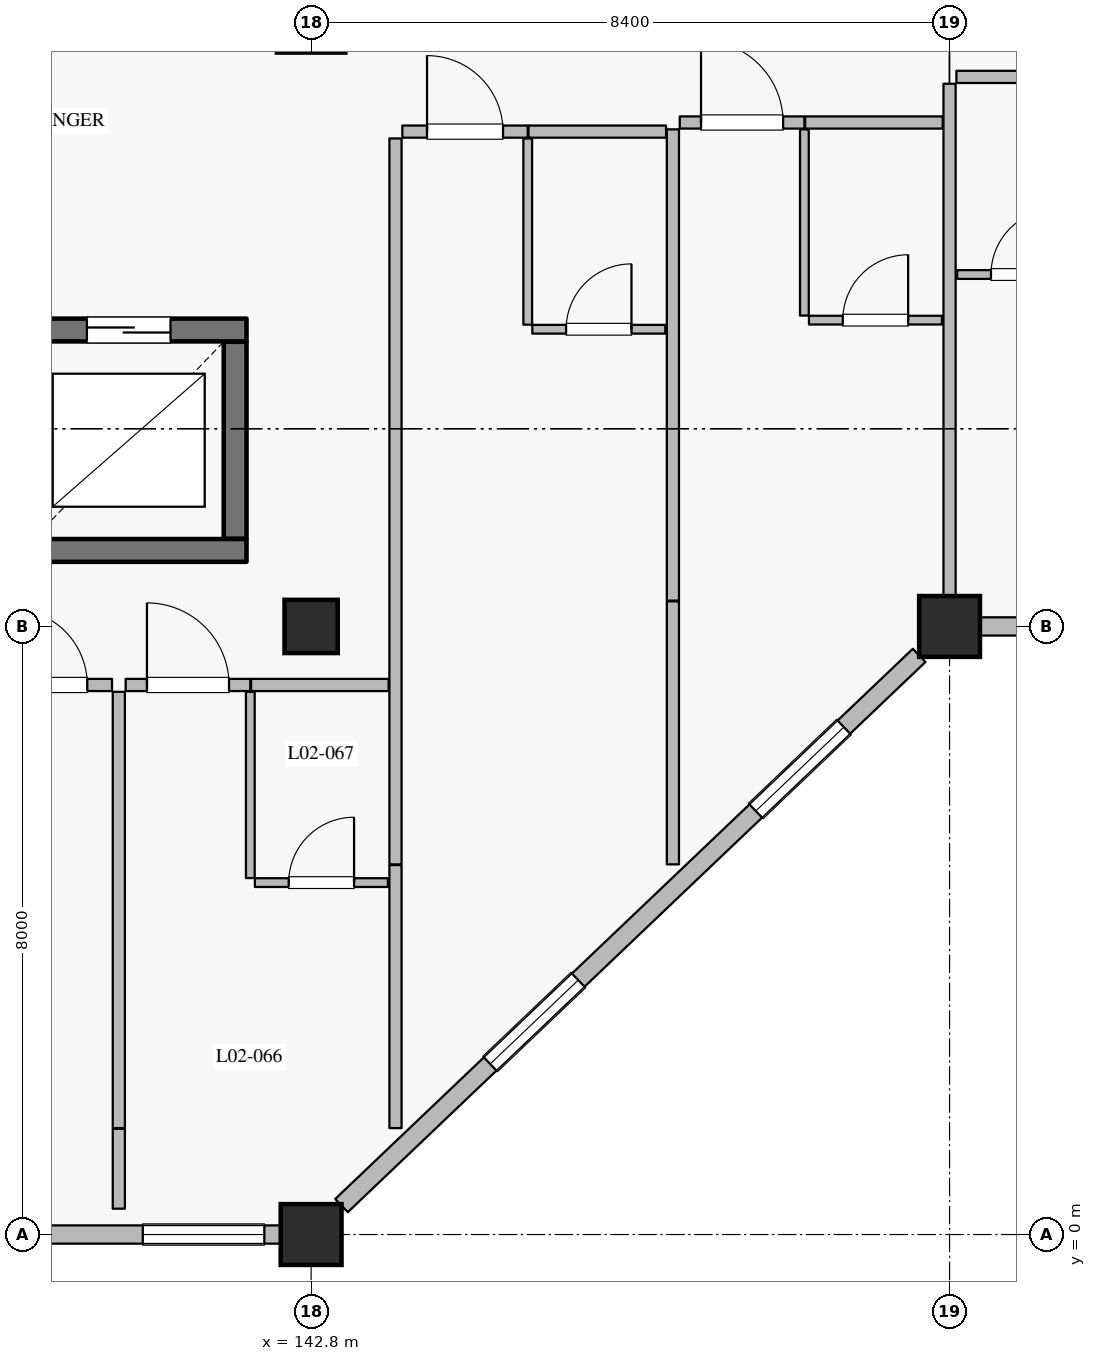
"""IFC4 building model, lengths in metres.
Left out: names, types, materials, properties, quantities, classifications, styles, units other than length and angle.
Written with IfcOpenShell. Run it as: python <this file> out.ifc"""

import sys

from ifc_helpers import new_model, si_unit, direction, frame, frame_2d, origin, origin_2d, place, context, subcontext, project, spatial, rectangle, extrude, element, fill, save


model = new_model("IFC4")
c1 = context("Model", 3, precision=1e-05, world=origin(), true_north=direction((0.0, 1.0)))
c2 = subcontext(c1, "Body", "Model", "MODEL_VIEW")
j1 = project(units=[si_unit("LENGTHUNIT", "METRE"), si_unit("PLANEANGLEUNIT", "RADIAN")], contexts=[c1])
p1 = place(None, origin())
s1 = spatial("IfcSite", under=j1, at=p1, CompositionType="ELEMENT")
p2 = place(p1, origin())
s2 = spatial("IfcBuilding", under=s1, at=p2, CompositionType="ELEMENT")
p3 = place(p2, frame((0.0, 0.0, 11.4)))
s3 = spatial("IfcBuildingStorey", under=s2, at=p3, CompositionType="ELEMENT", Elevation=11.4)
for number, where, z_axis, x_axis in (
    (1, (142.8, 0.0, 0.0), (0.0, 0.0, 1.0), (1.0, 0.0, 0.0)),
    (2, (151.2, 8.0, 0.0), (0.0, 0.0, 1.0), (1.0, 0.0, 0.0)),
):
    element("IfcColumn", number, at=place(p3, frame(where, z_axis=z_axis, x_axis=x_axis)), inside=s3, PredefinedType="COLUMN", context=c2, shape_type="SweptSolid", body=[
        extrude(rectangle(XDim=0.8, YDim=0.8, at=origin_2d()), origin(), (0.0, 0.0, 1.0), 4.8),
    ])
p4 = place(p3, frame((142.8, 8.0, 0.0), z_axis=(0.0, 0.0, 1.0), x_axis=(1.0, 0.0, 0.0)))
e3 = element("IfcColumn", 3, at=p4, inside=s3, PredefinedType="COLUMN", context=c2, shape_type="SweptSolid", body=[
    extrude(rectangle(XDim=0.7, YDim=0.7, at=origin_2d()), origin(), (0.0, 0.0, 1.0), 4.8),
])
p5 = place(p3, frame((142.4, 0.0, 0.0), z_axis=(0.0, 0.0, 1.0), x_axis=(-1.0, 0.0, 0.0)))
e4 = element("IfcWall", 4, at=p5, inside=s3, PredefinedType="SOLIDWALL", context=c2, shape_type="SweptSolid", body=[
    extrude(rectangle(XDim=7.6, YDim=0.24, at=frame_2d((3.8, 0.0))), origin(), (0.0, 0.0, 1.0), 4.13),
])
p6 = place(p5, frame((0.215, 0.0, 0.8)))
e5 = element("IfcOpeningElement", 5, at=p6, cuts=e4, PredefinedType="OPENING", context=c2, shape_type="SweptSolid", body=[
    extrude(rectangle(XDim=1.6, YDim=1.6, at=frame_2d((0.8, 0.8))), frame((0.0, 0.13, 0.0), z_axis=(0.0, -1.0, 0.0), x_axis=(1.0, 0.0, 0.0)), (0.0, 0.0, 1.0), 0.26),
])
p7 = place(p5, frame((3.155, 0.0, 0.8)))
e6 = element("IfcOpeningElement", 6, at=p7, cuts=e4, PredefinedType="OPENING", context=c2, shape_type="SweptSolid", body=[
    extrude(rectangle(XDim=1.6, YDim=1.6, at=frame_2d((0.8, 0.8))), frame((0.0, 0.13, 0.0), z_axis=(0.0, -1.0, 0.0), x_axis=(1.0, 0.0, 0.0)), (0.0, 0.0, 1.0), 0.26),
])
p8 = place(p5, frame((6.04, 0.0, 0.8)))
e7 = element("IfcOpeningElement", 7, at=p8, cuts=e4, PredefinedType="OPENING", context=c2, shape_type="SweptSolid", body=[
    extrude(rectangle(XDim=1.4, YDim=1.6, at=frame_2d((0.7, 0.8))), frame((0.0, 0.13, 0.0), z_axis=(0.0, -1.0, 0.0), x_axis=(1.0, 0.0, 0.0)), (0.0, 0.0, 1.0), 0.26),
])
p9 = place(p3, frame((150.8, 7.619, 0.0), z_axis=(0.0, 0.0, 1.0), x_axis=(-0.724156739794, -0.689635422677, 0.0)))
e8 = element("IfcWall", 8, at=p9, inside=s3, PredefinedType="SOLIDWALL", context=c2, shape_type="SweptSolid", body=[
    extrude(rectangle(XDim=10.495, YDim=0.24, at=frame_2d((5.248, 0.0))), origin(), (0.0, 0.0, 1.0), 4.13),
])
p10 = place(p9, frame((1.368, 0.0, 0.8)))
e9 = element("IfcOpeningElement", 9, at=p10, cuts=e8, PredefinedType="OPENING", context=c2, shape_type="SweptSolid", body=[
    extrude(rectangle(XDim=1.6, YDim=1.6, at=frame_2d((0.8, 0.8))), frame((0.0, 0.13, 0.0), z_axis=(0.0, -1.0, 0.0), x_axis=(1.0, 0.0, 0.0)), (0.0, 0.0, 1.0), 0.26),
])
p11 = place(p9, frame((6.194, 0.0, 0.8)))
e10 = element("IfcOpeningElement", 10, at=p11, cuts=e8, PredefinedType="OPENING", context=c2, shape_type="SweptSolid", body=[
    extrude(rectangle(XDim=1.6, YDim=1.6, at=frame_2d((0.8, 0.8))), frame((0.0, 0.13, 0.0), z_axis=(0.0, -1.0, 0.0), x_axis=(1.0, 0.0, 0.0)), (0.0, 0.0, 1.0), 0.26),
])
p12 = place(p3, frame((159.2, 8.0, 0.0), z_axis=(0.0, 0.0, 1.0), x_axis=(-1.0, 0.0, 0.0)))
e11 = element("IfcWall", 11, at=p12, inside=s3, PredefinedType="SOLIDWALL", context=c2, shape_type="SweptSolid", body=[
    extrude(rectangle(XDim=7.6, YDim=0.24, at=frame_2d((3.8, 0.0))), origin(), (0.0, 0.0, 1.0), 4.13),
])
p13 = place(p12, frame((1.735, 0.0, 0.8)))
e12 = element("IfcOpeningElement", 12, at=p13, cuts=e11, PredefinedType="OPENING", context=c2, shape_type="SweptSolid", body=[
    extrude(rectangle(XDim=1.6, YDim=1.6, at=frame_2d((0.8, 0.8))), frame((0.0, 0.13, 0.0), z_axis=(0.0, -1.0, 0.0), x_axis=(1.0, 0.0, 0.0)), (0.0, 0.0, 1.0), 0.26),
])
p14 = place(p12, frame((5.23, 0.0, 0.8)))
e13 = element("IfcOpeningElement", 13, at=p14, cuts=e11, PredefinedType="OPENING", context=c2, shape_type="SweptSolid", body=[
    extrude(rectangle(XDim=1.6, YDim=1.6, at=frame_2d((0.8, 0.8))), frame((0.0, 0.13, 0.0), z_axis=(0.0, -1.0, 0.0), x_axis=(1.0, 0.0, 0.0)), (0.0, 0.0, 1.0), 0.26),
])
p15 = place(p3, frame((138.85, 9.0, 0.0), z_axis=(0.0, 0.0, 1.0), x_axis=(1.0, 0.0, 0.0)))
e14 = element("IfcWall", 14, at=p15, inside=s3, PredefinedType="SHEAR", context=c2, shape_type="SweptSolid", body=[
    extrude(rectangle(XDim=3.1, YDim=0.3, at=frame_2d((1.55, 0.0))), origin(), (0.0, 0.0, 1.0), 4.535),
])
p16 = place(p3, frame((141.8, 9.155, 0.0), z_axis=(0.0, 0.0, 1.0), x_axis=(0.0, 1.0, 0.0)))
e15 = element("IfcWall", 15, at=p16, inside=s3, PredefinedType="SHEAR", context=c2, shape_type="SweptSolid", body=[
    extrude(rectangle(XDim=2.59, YDim=0.3, at=frame_2d((1.295, 0.0))), origin(), (0.0, 0.0, 1.0), 4.535),
])
p17 = place(p3, frame((141.95, 11.9, 0.0), z_axis=(0.0, 0.0, 1.0), x_axis=(-1.0, 0.0, 0.0)))
e16 = element("IfcWall", 16, at=p17, inside=s3, PredefinedType="SHEAR", context=c2, shape_type="SweptSolid", body=[
    extrude(rectangle(XDim=3.1, YDim=0.3, at=frame_2d((1.55, 0.0))), origin(), (0.0, 0.0, 1.0), 4.535),
])
p18 = place(p17, frame((1.0, 0.0, 0.0)))
e17 = element("IfcOpeningElement", 17, at=p18, cuts=e16, PredefinedType="OPENING", context=c2, shape_type="SweptSolid", body=[
    extrude(rectangle(XDim=1.1, YDim=2.2, at=frame_2d((0.55, 1.1))), frame((0.0, 0.16, 0.0), z_axis=(0.0, -1.0, 0.0), x_axis=(1.0, 0.0, 0.0)), (0.0, 0.0, 1.0), 0.32),
])
p19 = place(p3, frame((138.53, 7.23, 0.0), z_axis=(0.0, 0.0, 1.0), x_axis=(1.0, 0.0, 0.0)))
e18 = element("IfcWall", 18, at=p19, inside=s3, PredefinedType="PARTITIONING", context=c2, shape_type="SweptSolid", body=[
    extrude(rectangle(XDim=1.65, YDim=0.16, at=frame_2d((0.825, 0.0))), origin(), (0.0, 0.0, 1.0), 4.535),
])
p20 = place(p19, frame((0.325, 0.0, 0.0)))
e19 = element("IfcOpeningElement", 19, at=p20, cuts=e18, PredefinedType="OPENING", context=c2, shape_type="SweptSolid", body=[
    extrude(rectangle(XDim=1.0, YDim=2.25, at=frame_2d((0.5, 1.125))), frame((0.0, 0.09, 0.0), z_axis=(0.0, -1.0, 0.0), x_axis=(1.0, 0.0, 0.0)), (0.0, 0.0, 1.0), 0.18),
])
p21 = place(p3, frame((140.27, 0.34, 0.0), z_axis=(0.0, 0.0, 1.0), x_axis=(0.0, 1.0, 0.0)))
e20 = element("IfcWall", 20, at=p21, inside=s3, PredefinedType="PARTITIONING", context=c2, shape_type="SweptSolid", body=[
    extrude(rectangle(XDim=1.05, YDim=0.16, at=frame_2d((0.525, 0.0))), origin(), (0.0, 0.0, 1.0), 4.535),
])
p22 = place(p3, frame((140.36, 7.23, 0.0), z_axis=(0.0, 0.0, 1.0), x_axis=(1.0, 0.0, 0.0)))
e21 = element("IfcWall", 21, at=p22, inside=s3, PredefinedType="PARTITIONING", context=c2, shape_type="SweptSolid", body=[
    extrude(rectangle(XDim=1.64, YDim=0.16, at=frame_2d((0.82, 0.0))), origin(), (0.0, 0.0, 1.0), 4.535),
])
p23 = place(p22, frame((0.28, 0.0, 0.0)))
e22 = element("IfcOpeningElement", 22, at=p23, cuts=e21, PredefinedType="OPENING", context=c2, shape_type="SweptSolid", body=[
    extrude(rectangle(XDim=1.08, YDim=2.3, at=frame_2d((0.54, 1.15))), frame((0.0, 0.09, 0.0), z_axis=(0.0, -1.0, 0.0), x_axis=(1.0, 0.0, 0.0)), (0.0, 0.0, 1.0), 0.18),
])
p24 = place(p3, frame((142.01, 7.23, 0.0), z_axis=(0.0, 0.0, 1.0), x_axis=(1.0, 0.0, 0.0)))
e23 = element("IfcWall", 23, at=p24, inside=s3, PredefinedType="PARTITIONING", context=c2, shape_type="SweptSolid", body=[
    extrude(rectangle(XDim=1.81, YDim=0.16, at=frame_2d((0.905, 0.0))), origin(), (0.0, 0.0, 1.0), 4.535),
])
p25 = place(p3, frame((142.0, 4.69, 0.0), z_axis=(0.0, 0.0, 1.0), x_axis=(0.0, 1.0, 0.0)))
e24 = element("IfcWall", 24, at=p25, inside=s3, PredefinedType="PARTITIONING", context=c2, shape_type="SweptSolid", body=[
    extrude(rectangle(XDim=2.45, YDim=0.115, at=frame_2d((1.225, 0.0))), origin(), (0.0, 0.0, 1.0), 4.535),
])
p26 = place(p3, frame((142.06, 4.63, 0.0), z_axis=(0.0, 0.0, 1.0), x_axis=(1.0, 0.0, 0.0)))
e25 = element("IfcWall", 25, at=p26, inside=s3, PredefinedType="PARTITIONING", context=c2, shape_type="SweptSolid", body=[
    extrude(rectangle(XDim=1.75, YDim=0.115, at=frame_2d((0.875, 0.0))), origin(), (0.0, 0.0, 1.0), 4.535),
])
p27 = place(p26, frame((0.445, 0.0, 0.0)))
e26 = element("IfcOpeningElement", 26, at=p27, cuts=e25, PredefinedType="OPENING", context=c2, shape_type="SweptSolid", body=[
    extrude(rectangle(XDim=0.86, YDim=2.12, at=frame_2d((0.43, 1.06))), frame((0.0, 0.067, 0.0), z_axis=(0.0, -1.0, 0.0), x_axis=(1.0, 0.0, 0.0)), (0.0, 0.0, 1.0), 0.135),
])
p28 = place(p3, frame((140.27, 1.4, 0.0), z_axis=(0.0, 0.0, 1.0), x_axis=(0.0, 1.0, 0.0)))
e27 = element("IfcWall", 27, at=p28, inside=s3, PredefinedType="PARTITIONING", context=c2, shape_type="SweptSolid", body=[
    extrude(rectangle(XDim=5.74, YDim=0.16, at=frame_2d((2.87, 0.0))), origin(), (0.0, 0.0, 1.0), 4.535),
])
p29 = place(p3, frame((143.91, 1.4, 0.0), z_axis=(0.0, 0.0, 1.0), x_axis=(0.0, 1.0, 0.0)))
e28 = element("IfcWall", 28, at=p29, inside=s3, PredefinedType="PARTITIONING", context=c2, shape_type="SweptSolid", body=[
    extrude(rectangle(XDim=3.46, YDim=0.16, at=frame_2d((1.73, 0.0))), origin(), (0.0, 0.0, 1.0), 4.535),
])
p30 = place(p3, frame((144.0, 14.51, 0.0), z_axis=(0.0, 0.0, 1.0), x_axis=(1.0, 0.0, 0.0)))
e29 = element("IfcWall", 29, at=p30, inside=s3, PredefinedType="PARTITIONING", context=c2, shape_type="SweptSolid", body=[
    extrude(rectangle(XDim=1.65, YDim=0.16, at=frame_2d((0.825, 0.0))), origin(), (0.0, 0.0, 1.0), 4.535),
])
p31 = place(p30, frame((0.325, 0.0, 0.0)))
e30 = element("IfcOpeningElement", 30, at=p31, cuts=e29, PredefinedType="OPENING", context=c2, shape_type="SweptSolid", body=[
    extrude(rectangle(XDim=1.0, YDim=2.25, at=frame_2d((0.5, 1.125))), frame((0.0, 0.09, 0.0), z_axis=(0.0, -1.0, 0.0), x_axis=(1.0, 0.0, 0.0)), (0.0, 0.0, 1.0), 0.18),
])
p32 = place(p3, frame((145.66, 14.51, 0.0), z_axis=(0.0, 0.0, 1.0), x_axis=(1.0, 0.0, 0.0)))
e31 = element("IfcWall", 31, at=p32, inside=s3, PredefinedType="PARTITIONING", context=c2, shape_type="SweptSolid", body=[
    extrude(rectangle(XDim=1.81, YDim=0.16, at=frame_2d((0.905, 0.0))), origin(), (0.0, 0.0, 1.0), 4.535),
])
p33 = place(p3, frame((145.65, 11.97, 0.0), z_axis=(0.0, 0.0, 1.0), x_axis=(0.0, 1.0, 0.0)))
e32 = element("IfcWall", 32, at=p33, inside=s3, PredefinedType="PARTITIONING", context=c2, shape_type="SweptSolid", body=[
    extrude(rectangle(XDim=2.45, YDim=0.115, at=frame_2d((1.225, 0.0))), origin(), (0.0, 0.0, 1.0), 4.535),
])
p34 = place(p3, frame((145.71, 11.91, 0.0), z_axis=(0.0, 0.0, 1.0), x_axis=(1.0, 0.0, 0.0)))
e33 = element("IfcWall", 33, at=p34, inside=s3, PredefinedType="PARTITIONING", context=c2, shape_type="SweptSolid", body=[
    extrude(rectangle(XDim=1.75, YDim=0.115, at=frame_2d((0.875, 0.0))), origin(), (0.0, 0.0, 1.0), 4.535),
])
p35 = place(p34, frame((0.445, 0.0, 0.0)))
e34 = element("IfcOpeningElement", 34, at=p35, cuts=e33, PredefinedType="OPENING", context=c2, shape_type="SweptSolid", body=[
    extrude(rectangle(XDim=0.86, YDim=2.12, at=frame_2d((0.43, 1.06))), frame((0.0, 0.067, 0.0), z_axis=(0.0, -1.0, 0.0), x_axis=(1.0, 0.0, 0.0)), (0.0, 0.0, 1.0), 0.135),
])
p36 = place(p3, frame((143.91, 4.87, 0.0), z_axis=(0.0, 0.0, 1.0), x_axis=(0.0, 1.0, 0.0)))
e35 = element("IfcWall", 35, at=p36, inside=s3, PredefinedType="PARTITIONING", context=c2, shape_type="SweptSolid", body=[
    extrude(rectangle(XDim=9.55, YDim=0.16, at=frame_2d((4.775, 0.0))), origin(), (0.0, 0.0, 1.0), 4.535),
])
p37 = place(p3, frame((147.56, 4.87, 0.0), z_axis=(0.0, 0.0, 1.0), x_axis=(0.0, 1.0, 0.0)))
e36 = element("IfcWall", 36, at=p37, inside=s3, PredefinedType="PARTITIONING", context=c2, shape_type="SweptSolid", body=[
    extrude(rectangle(XDim=3.46, YDim=0.16, at=frame_2d((1.73, 0.0))), origin(), (0.0, 0.0, 1.0), 4.535),
])
p38 = place(p3, frame((147.65, 14.63, 0.0), z_axis=(0.0, 0.0, 1.0), x_axis=(1.0, 0.0, 0.0)))
e37 = element("IfcWall", 37, at=p38, inside=s3, PredefinedType="PARTITIONING", context=c2, shape_type="SweptSolid", body=[
    extrude(rectangle(XDim=1.64, YDim=0.16, at=frame_2d((0.82, 0.0))), origin(), (0.0, 0.0, 1.0), 4.535),
])
p39 = place(p38, frame((0.28, 0.0, 0.0)))
e38 = element("IfcOpeningElement", 38, at=p39, cuts=e37, PredefinedType="OPENING", context=c2, shape_type="SweptSolid", body=[
    extrude(rectangle(XDim=1.08, YDim=2.3, at=frame_2d((0.54, 1.15))), frame((0.0, 0.09, 0.0), z_axis=(0.0, -1.0, 0.0), x_axis=(1.0, 0.0, 0.0)), (0.0, 0.0, 1.0), 0.18),
])
p40 = place(p3, frame((149.3, 14.63, 0.0), z_axis=(0.0, 0.0, 1.0), x_axis=(1.0, 0.0, 0.0)))
e39 = element("IfcWall", 39, at=p40, inside=s3, PredefinedType="PARTITIONING", context=c2, shape_type="SweptSolid", body=[
    extrude(rectangle(XDim=1.81, YDim=0.16, at=frame_2d((0.905, 0.0))), origin(), (0.0, 0.0, 1.0), 4.535),
])
p41 = place(p3, frame((149.29, 12.09, 0.0), z_axis=(0.0, 0.0, 1.0), x_axis=(0.0, 1.0, 0.0)))
e40 = element("IfcWall", 40, at=p41, inside=s3, PredefinedType="PARTITIONING", context=c2, shape_type="SweptSolid", body=[
    extrude(rectangle(XDim=2.45, YDim=0.115, at=frame_2d((1.225, 0.0))), origin(), (0.0, 0.0, 1.0), 4.535),
])
p42 = place(p3, frame((149.35, 12.03, 0.0), z_axis=(0.0, 0.0, 1.0), x_axis=(1.0, 0.0, 0.0)))
e41 = element("IfcWall", 41, at=p42, inside=s3, PredefinedType="PARTITIONING", context=c2, shape_type="SweptSolid", body=[
    extrude(rectangle(XDim=1.75, YDim=0.115, at=frame_2d((0.875, 0.0))), origin(), (0.0, 0.0, 1.0), 4.535),
])
p43 = place(p42, frame((0.445, 0.0, 0.0)))
e42 = element("IfcOpeningElement", 42, at=p43, cuts=e41, PredefinedType="OPENING", context=c2, shape_type="SweptSolid", body=[
    extrude(rectangle(XDim=0.86, YDim=2.12, at=frame_2d((0.43, 1.06))), frame((0.0, 0.067, 0.0), z_axis=(0.0, -1.0, 0.0), x_axis=(1.0, 0.0, 0.0)), (0.0, 0.0, 1.0), 0.135),
])
p44 = place(p3, frame((147.56, 8.34, 0.0), z_axis=(0.0, 0.0, 1.0), x_axis=(0.0, 1.0, 0.0)))
e43 = element("IfcWall", 43, at=p44, inside=s3, PredefinedType="PARTITIONING", context=c2, shape_type="SweptSolid", body=[
    extrude(rectangle(XDim=6.2, YDim=0.16, at=frame_2d((3.1, 0.0))), origin(), (0.0, 0.0, 1.0), 4.535),
])
p45 = place(p3, frame((151.29, 15.23, 0.0), z_axis=(0.0, 0.0, 1.0), x_axis=(1.0, 0.0, 0.0)))
e44 = element("IfcWall", 44, at=p45, inside=s3, PredefinedType="PARTITIONING", context=c2, shape_type="SweptSolid", body=[
    extrude(rectangle(XDim=1.81, YDim=0.16, at=frame_2d((0.905, 0.0))), origin(), (0.0, 0.0, 1.0), 4.535),
])
p46 = place(p3, frame((151.3, 12.63, 0.0), z_axis=(0.0, 0.0, 1.0), x_axis=(1.0, 0.0, 0.0)))
e45 = element("IfcWall", 45, at=p46, inside=s3, PredefinedType="PARTITIONING", context=c2, shape_type="SweptSolid", body=[
    extrude(rectangle(XDim=1.75, YDim=0.115, at=frame_2d((0.875, 0.0))), origin(), (0.0, 0.0, 1.0), 4.535),
])
p47 = place(p46, frame((0.445, 0.0, 0.0)))
e46 = element("IfcOpeningElement", 46, at=p47, cuts=e45, PredefinedType="OPENING", context=c2, shape_type="SweptSolid", body=[
    extrude(rectangle(XDim=0.86, YDim=2.12, at=frame_2d((0.43, 1.06))), frame((0.0, 0.067, 0.0), z_axis=(0.0, -1.0, 0.0), x_axis=(1.0, 0.0, 0.0)), (0.0, 0.0, 1.0), 0.135),
])
p48 = place(p3, frame((151.2, 8.34, 0.0), z_axis=(0.0, 0.0, 1.0), x_axis=(0.0, 1.0, 0.0)))
e47 = element("IfcWall", 47, at=p48, inside=s3, PredefinedType="PARTITIONING", context=c2, shape_type="SweptSolid", body=[
    extrude(rectangle(XDim=6.8, YDim=0.16, at=frame_2d((3.4, 0.0))), origin(), (0.0, 0.0, 1.0), 3.98),
])
p49 = place(p6, origin())
e48 = element("IfcWindow", 48, at=p49, inside=s3, PartitioningType="SINGLE_PANEL", PredefinedType="WINDOW", context=c2, shape_type="SweptSolid", body=[
    extrude(rectangle(XDim=1.6, YDim=1.6, at=frame_2d((0.8, 0.8))), frame((0.0, 0.03, 0.0), z_axis=(0.0, -1.0, 0.0), x_axis=(1.0, 0.0, 0.0)), (0.0, 0.0, 1.0), 0.06),
])
fill(e5, e48)
p50 = place(p10, origin())
e49 = element("IfcWindow", 49, at=p50, inside=s3, PartitioningType="SINGLE_PANEL", PredefinedType="WINDOW", context=c2, shape_type="SweptSolid", body=[
    extrude(rectangle(XDim=1.6, YDim=1.6, at=frame_2d((0.8, 0.8))), frame((0.0, 0.03, 0.0), z_axis=(0.0, -1.0, 0.0), x_axis=(1.0, 0.0, 0.0)), (0.0, 0.0, 1.0), 0.06),
])
fill(e9, e49)
p51 = place(p11, origin())
e50 = element("IfcWindow", 50, at=p51, inside=s3, PartitioningType="SINGLE_PANEL", PredefinedType="WINDOW", context=c2, shape_type="SweptSolid", body=[
    extrude(rectangle(XDim=1.6, YDim=1.6, at=frame_2d((0.8, 0.8))), frame((0.0, 0.03, 0.0), z_axis=(0.0, -1.0, 0.0), x_axis=(1.0, 0.0, 0.0)), (0.0, 0.0, 1.0), 0.06),
])
fill(e10, e50)
p52 = place(p18, origin())
e51 = element("IfcDoor", 51, at=p52, inside=s3, OperationType="DOUBLE_DOOR_SLIDING", PredefinedType="DOOR", context=c2, shape_type="SweptSolid", body=[
    extrude(rectangle(XDim=1.1, YDim=2.2, at=frame_2d((0.55, 1.1))), frame((0.0, 0.025, 0.0), z_axis=(0.0, -1.0, 0.0), x_axis=(1.0, 0.0, 0.0)), (0.0, 0.0, 1.0), 0.05),
])
fill(e17, e51)
p53 = place(p20, origin())
e52 = element("IfcDoor", 52, at=p53, inside=s3, OperationType="SINGLE_SWING_LEFT", PredefinedType="DOOR", context=c2, shape_type="SweptSolid", body=[
    extrude(rectangle(XDim=1.0, YDim=2.25, at=frame_2d((0.5, 1.125))), frame((0.0, 0.025, 0.0), z_axis=(0.0, -1.0, 0.0), x_axis=(1.0, 0.0, 0.0)), (0.0, 0.0, 1.0), 0.05),
])
fill(e19, e52)
p54 = place(p23, origin())
e53 = element("IfcDoor", 53, at=p54, inside=s3, OperationType="SINGLE_SWING_LEFT", PredefinedType="DOOR", context=c2, shape_type="SweptSolid", body=[
    extrude(rectangle(XDim=1.08, YDim=2.3, at=frame_2d((0.54, 1.15))), frame((0.0, 0.025, 0.0), z_axis=(0.0, -1.0, 0.0), x_axis=(1.0, 0.0, 0.0)), (0.0, 0.0, 1.0), 0.05),
])
fill(e22, e53)
p55 = place(p27, origin())
e54 = element("IfcDoor", 54, at=p55, inside=s3, OperationType="SINGLE_SWING_RIGHT", PredefinedType="DOOR", context=c2, shape_type="SweptSolid", body=[
    extrude(rectangle(XDim=0.86, YDim=2.12, at=frame_2d((0.43, 1.06))), frame((0.0, 0.025, 0.0), z_axis=(0.0, -1.0, 0.0), x_axis=(1.0, 0.0, 0.0)), (0.0, 0.0, 1.0), 0.05),
])
fill(e26, e54)
p56 = place(p31, origin())
e55 = element("IfcDoor", 55, at=p56, inside=s3, OperationType="SINGLE_SWING_LEFT", PredefinedType="DOOR", context=c2, shape_type="SweptSolid", body=[
    extrude(rectangle(XDim=1.0, YDim=2.25, at=frame_2d((0.5, 1.125))), frame((0.0, 0.025, 0.0), z_axis=(0.0, -1.0, 0.0), x_axis=(1.0, 0.0, 0.0)), (0.0, 0.0, 1.0), 0.05),
])
fill(e30, e55)
p57 = place(p35, origin())
e56 = element("IfcDoor", 56, at=p57, inside=s3, OperationType="SINGLE_SWING_RIGHT", PredefinedType="DOOR", context=c2, shape_type="SweptSolid", body=[
    extrude(rectangle(XDim=0.86, YDim=2.12, at=frame_2d((0.43, 1.06))), frame((0.0, 0.025, 0.0), z_axis=(0.0, -1.0, 0.0), x_axis=(1.0, 0.0, 0.0)), (0.0, 0.0, 1.0), 0.05),
])
fill(e34, e56)
p58 = place(p39, origin())
e57 = element("IfcDoor", 57, at=p58, inside=s3, OperationType="SINGLE_SWING_LEFT", PredefinedType="DOOR", context=c2, shape_type="SweptSolid", body=[
    extrude(rectangle(XDim=1.08, YDim=2.3, at=frame_2d((0.54, 1.15))), frame((0.0, 0.025, 0.0), z_axis=(0.0, -1.0, 0.0), x_axis=(1.0, 0.0, 0.0)), (0.0, 0.0, 1.0), 0.05),
])
fill(e38, e57)
p59 = place(p43, origin())
e58 = element("IfcDoor", 58, at=p59, inside=s3, OperationType="SINGLE_SWING_RIGHT", PredefinedType="DOOR", context=c2, shape_type="SweptSolid", body=[
    extrude(rectangle(XDim=0.86, YDim=2.12, at=frame_2d((0.43, 1.06))), frame((0.0, 0.025, 0.0), z_axis=(0.0, -1.0, 0.0), x_axis=(1.0, 0.0, 0.0)), (0.0, 0.0, 1.0), 0.05),
])
fill(e42, e58)
p60 = place(p47, origin())
e59 = element("IfcDoor", 59, at=p60, inside=s3, OperationType="SINGLE_SWING_RIGHT", PredefinedType="DOOR", context=c2, shape_type="SweptSolid", body=[
    extrude(rectangle(XDim=0.86, YDim=2.12, at=frame_2d((0.43, 1.06))), frame((0.0, 0.025, 0.0), z_axis=(0.0, -1.0, 0.0), x_axis=(1.0, 0.0, 0.0)), (0.0, 0.0, 1.0), 0.05),
])
fill(e46, e59)
save(model, sys.argv[1])
